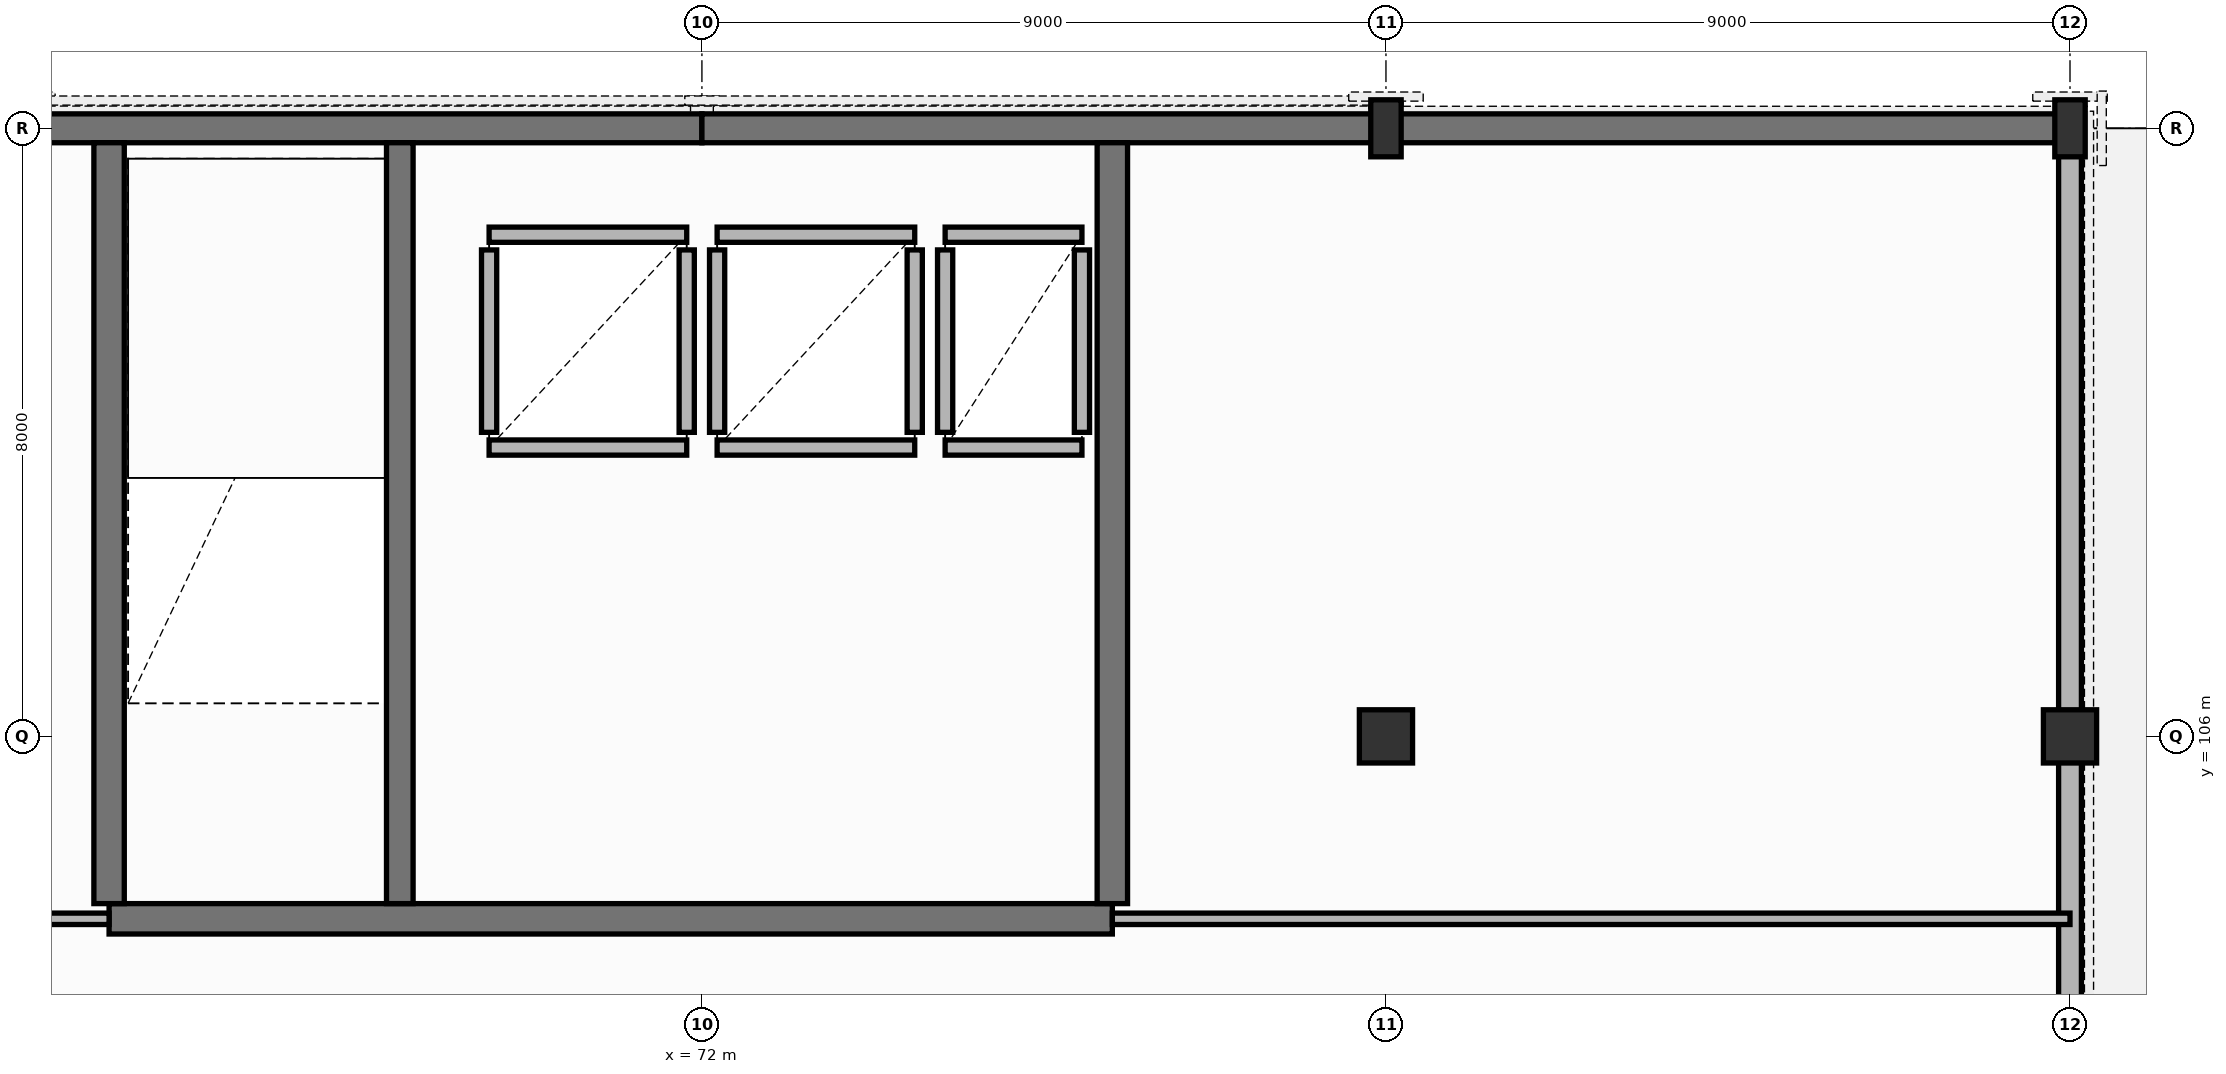
"""IFC4 building model, lengths in metres.
Left out: names, types, materials, properties, quantities, classifications, styles, units other than length and angle.
Written with IfcOpenShell. Run it as: python <this file> out.ifc"""

import sys

from ifc_helpers import new_model, si_unit, direction, frame, frame_2d, origin, origin_2d, place, context, subcontext, project, spatial, rectangle, extrude, element, fill, save


model = new_model("IFC4")
c1 = context("Model", 3, precision=1e-05, world=origin(), true_north=direction((0.0, 1.0)))
c2 = subcontext(c1, "Body", "Model", "MODEL_VIEW")
j1 = project(units=[si_unit("LENGTHUNIT", "METRE"), si_unit("PLANEANGLEUNIT", "RADIAN")], contexts=[c1])
p1 = place(None, origin())
s1 = spatial("IfcSite", under=j1, at=p1, CompositionType="ELEMENT")
p2 = place(p1, origin())
s2 = spatial("IfcBuilding", under=s1, at=p2, CompositionType="ELEMENT")
p3 = place(p2, frame((0.0, 0.0, 12.78)))
s3 = spatial("IfcBuildingStorey", under=s2, at=p3, CompositionType="ELEMENT", Elevation=12.78)
p4 = place(p3, frame((81.0, 106.0, 0.0), z_axis=(0.0, 0.0, 1.0), x_axis=(1.0, 0.0, 0.0)))
e1 = element("IfcColumn", 1, at=p4, inside=s3, PredefinedType="COLUMN", context=c2, shape_type="SweptSolid", body=[
    extrude(rectangle(XDim=0.7, YDim=0.7, at=origin_2d()), origin(), (0.0, 0.0, 1.0), 3.74),
])
p5 = place(p3, frame((81.0, 114.0, 0.0), z_axis=(0.0, 0.0, 1.0), x_axis=(0.0, 1.0, 0.0)))
e2 = element("IfcColumn", 2, at=p5, inside=s3, PredefinedType="COLUMN", context=c2, shape_type="SweptSolid", body=[
    extrude(rectangle(XDim=0.4, YDim=0.75, at=origin_2d()), origin(), (0.0, 0.0, 1.0), 3.74),
])
p6 = place(p3, frame((90.0, 106.0, 0.0), z_axis=(0.0, 0.0, 1.0), x_axis=(1.0, 0.0, 0.0)))
e3 = element("IfcColumn", 3, at=p6, inside=s3, PredefinedType="COLUMN", context=c2, shape_type="SweptSolid", body=[
    extrude(rectangle(XDim=0.7, YDim=0.7, at=origin_2d()), origin(), (0.0, 0.0, 1.0), 3.74),
])
p7 = place(p3, frame((90.0, 114.0, 0.0), z_axis=(0.0, 0.0, 1.0), x_axis=(0.0, 1.0, 0.0)))
e4 = element("IfcColumn", 4, at=p7, inside=s3, PredefinedType="COLUMN", context=c2, shape_type="SweptSolid", body=[
    extrude(rectangle(XDim=0.4, YDim=0.75, at=origin_2d()), origin(), (0.0, 0.0, 1.0), 3.74),
])
for number, where, z_axis, x_axis in (
    (5, (63.0, 114.0, 0.0), (0.0, 0.0, 1.0), (1.0, 0.0, 0.0)),
    (6, (72.0, 114.0, 0.0), (0.0, 0.0, 1.0), (1.0, 0.0, 0.0)),
):
    element("IfcWall", number, at=place(p3, frame(where, z_axis=z_axis, x_axis=x_axis)), inside=s3, PredefinedType="SOLIDWALL", context=c2, shape_type="SweptSolid", body=[
        extrude(rectangle(XDim=9.0, YDim=0.38, at=frame_2d((4.5, 0.0))), origin(), (0.0, 0.0, 1.0), 3.42),
    ])
p8 = place(p3, frame((81.0, 114.0, 0.0), z_axis=(0.0, 0.0, 1.0), x_axis=(1.0, 0.0, 0.0)))
e7 = element("IfcWall", 7, at=p8, inside=s3, PredefinedType="SOLIDWALL", context=c2, shape_type="SweptSolid", body=[
    extrude(rectangle(XDim=9.0, YDim=0.38, at=frame_2d((4.5, 0.0))), origin(), (0.0, 0.0, 1.0), 3.42),
])
p9 = place(p8, frame((2.2, 0.0, 0.815)))
e8 = element("IfcOpeningElement", 8, at=p9, cuts=e7, PredefinedType="OPENING", context=c2, shape_type="SweptSolid", body=[
    extrude(rectangle(XDim=0.96, YDim=1.95, at=frame_2d((0.48, 0.975))), frame((0.0, 0.2, 0.0), z_axis=(0.0, -1.0, 0.0), x_axis=(1.0, 0.0, 0.0)), (0.0, 0.0, 1.0), 0.4),
])
p10 = place(p8, frame((5.4, 0.0, 1.05)))
e9 = element("IfcOpeningElement", 9, at=p10, cuts=e7, PredefinedType="OPENING", context=c2, shape_type="SweptSolid", body=[
    extrude(rectangle(XDim=1.1, YDim=1.65, at=frame_2d((0.55, 0.825))), frame((0.0, 0.2, 0.0), z_axis=(0.0, -1.0, 0.0), x_axis=(1.0, 0.0, 0.0)), (0.0, 0.0, 1.0), 0.4),
])
p11 = place(p3, frame((90.0, 95.6, 0.0), z_axis=(0.0, 0.0, 1.0), x_axis=(0.0, 1.0, 0.0)))
e10 = element("IfcWall", 10, at=p11, inside=s3, PredefinedType="SOLIDWALL", context=c2, shape_type="SweptSolid", body=[
    extrude(rectangle(XDim=18.4, YDim=0.3, at=frame_2d((9.2, 0.0))), origin(), (0.0, 0.0, 1.0), 2.805),
])
p12 = place(p11, frame((4.4, 0.0, 0.0)))
e11 = element("IfcOpeningElement", 11, at=p12, cuts=e10, PredefinedType="OPENING", context=c2, shape_type="SweptSolid", body=[
    extrude(rectangle(XDim=1.6, YDim=2.25, at=frame_2d((0.8, 1.125))), frame((0.0, 0.16, 0.0), z_axis=(0.0, -1.0, 0.0), x_axis=(1.0, 0.0, 0.0)), (0.0, 0.0, 1.0), 0.32),
])
p13 = place(p11, frame((12.8, 0.0, 0.935)))
e12 = element("IfcOpeningElement", 12, at=p13, cuts=e10, PredefinedType="OPENING", context=c2, shape_type="SweptSolid", body=[
    extrude(rectangle(XDim=1.05, YDim=1.75, at=frame_2d((0.525, 0.875))), frame((0.0, 0.16, 0.0), z_axis=(0.0, -1.0, 0.0), x_axis=(1.0, 0.0, 0.0)), (0.0, 0.0, 1.0), 0.32),
])
p14 = place(p3, frame((64.2, 103.6, 0.0), z_axis=(0.0, 0.0, 1.0), x_axis=(1.0, 0.0, 0.0)))
e13 = element("IfcWall", 13, at=p14, inside=s3, PredefinedType="SHEAR", context=c2, shape_type="SweptSolid", body=[
    extrude(rectangle(XDim=13.2, YDim=0.4, at=frame_2d((6.6, 0.0))), origin(), (0.0, 0.0, 1.0), 3.42),
])
p15 = place(p14, frame((5.8, 0.0, 0.0)))
e14 = element("IfcOpeningElement", 14, at=p15, cuts=e13, PredefinedType="OPENING", context=c2, shape_type="SweptSolid", body=[
    extrude(rectangle(XDim=1.5, YDim=2.2, at=frame_2d((0.75, 1.1))), frame((0.0, 0.21, 0.0), z_axis=(0.0, -1.0, 0.0), x_axis=(1.0, 0.0, 0.0)), (0.0, 0.0, 1.0), 0.42),
])
for number, where, z_axis, x_axis in (
    (15, (64.2, 103.8, 0.0), (0.0, 0.0, 1.0), (0.0, 1.0, 0.0)),
    (16, (77.4, 103.8, 0.0), (0.0, 0.0, 1.0), (0.0, 1.0, 0.0)),
):
    element("IfcWall", number, at=place(p3, frame(where, z_axis=z_axis, x_axis=x_axis)), inside=s3, PredefinedType="SHEAR", context=c2, shape_type="SweptSolid", body=[
        extrude(rectangle(XDim=10.01, YDim=0.4, at=frame_2d((5.005, 0.0))), origin(), (0.0, 0.0, 1.0), 3.42),
    ])
p16 = place(p3, frame((68.025, 103.8, 0.0), z_axis=(0.0, 0.0, 1.0), x_axis=(0.0, 1.0, 0.0)))
e17 = element("IfcWall", 17, at=p16, inside=s3, PredefinedType="SHEAR", context=c2, shape_type="SweptSolid", body=[
    extrude(rectangle(XDim=10.01, YDim=0.35, at=frame_2d((5.005, 0.0))), origin(), (0.0, 0.0, 1.0), 3.42),
])
p17 = place(p16, frame((0.45, 0.0, 0.0)))
e18 = element("IfcOpeningElement", 18, at=p17, cuts=e17, PredefinedType="OPENING", context=c2, shape_type="SweptSolid", body=[
    extrude(rectangle(XDim=1.05, YDim=2.2, at=frame_2d((0.525, 1.1))), frame((0.0, 0.185, 0.0), z_axis=(0.0, -1.0, 0.0), x_axis=(1.0, 0.0, 0.0)), (0.0, 0.0, 1.0), 0.37),
])
p18 = place(p3, frame((69.2, 109.8, 0.0), z_axis=(0.0, 0.0, 1.0), x_axis=(1.0, 0.0, 0.0)))
e19 = element("IfcWall", 19, at=p18, inside=s3, PredefinedType="PARTITIONING", context=c2, shape_type="SweptSolid", body=[
    extrude(rectangle(XDim=2.6, YDim=0.2, at=frame_2d((1.3, 0.0))), origin(), (0.0, 0.0, 1.0), 3.42),
])
p19 = place(p18, frame((0.75, 0.0, 0.0)))
e20 = element("IfcOpeningElement", 20, at=p19, cuts=e19, PredefinedType="OPENING", context=c2, shape_type="SweptSolid", body=[
    extrude(rectangle(XDim=1.1, YDim=2.15, at=frame_2d((0.55, 1.075))), frame((0.0, 0.11, 0.0), z_axis=(0.0, -1.0, 0.0), x_axis=(1.0, 0.0, 0.0)), (0.0, 0.0, 1.0), 0.22),
])
p20 = place(p3, frame((69.2, 112.6, 0.0), z_axis=(0.0, 0.0, 1.0), x_axis=(1.0, 0.0, 0.0)))
e21 = element("IfcWall", 21, at=p20, inside=s3, PredefinedType="PARTITIONING", context=c2, shape_type="SweptSolid", body=[
    extrude(rectangle(XDim=2.6, YDim=0.2, at=frame_2d((1.3, 0.0))), origin(), (0.0, 0.0, 1.0), 3.42),
])
for number, where, z_axis, x_axis in (
    (22, (69.2, 110.0, 0.0), (0.0, 0.0, 1.0), (0.0, 1.0, 0.0)),
    (23, (71.8, 110.0, 0.0), (0.0, 0.0, 1.0), (0.0, 1.0, 0.0)),
):
    element("IfcWall", number, at=place(p3, frame(where, z_axis=z_axis, x_axis=x_axis)), inside=s3, PredefinedType="PARTITIONING", context=c2, shape_type="SweptSolid", body=[
        extrude(rectangle(XDim=2.4, YDim=0.2, at=frame_2d((1.2, 0.0))), origin(), (0.0, 0.0, 1.0), 3.42),
    ])
p21 = place(p3, frame((72.2, 109.8, 0.0), z_axis=(0.0, 0.0, 1.0), x_axis=(1.0, 0.0, 0.0)))
e24 = element("IfcWall", 24, at=p21, inside=s3, PredefinedType="PARTITIONING", context=c2, shape_type="SweptSolid", body=[
    extrude(rectangle(XDim=2.6, YDim=0.2, at=frame_2d((1.3, 0.0))), origin(), (0.0, 0.0, 1.0), 3.42),
])
p22 = place(p21, frame((0.75, 0.0, 0.0)))
e25 = element("IfcOpeningElement", 25, at=p22, cuts=e24, PredefinedType="OPENING", context=c2, shape_type="SweptSolid", body=[
    extrude(rectangle(XDim=1.1, YDim=2.15, at=frame_2d((0.55, 1.075))), frame((0.0, 0.11, 0.0), z_axis=(0.0, -1.0, 0.0), x_axis=(1.0, 0.0, 0.0)), (0.0, 0.0, 1.0), 0.22),
])
p23 = place(p3, frame((72.2, 112.6, 0.0), z_axis=(0.0, 0.0, 1.0), x_axis=(1.0, 0.0, 0.0)))
e26 = element("IfcWall", 26, at=p23, inside=s3, PredefinedType="PARTITIONING", context=c2, shape_type="SweptSolid", body=[
    extrude(rectangle(XDim=2.6, YDim=0.2, at=frame_2d((1.3, 0.0))), origin(), (0.0, 0.0, 1.0), 3.42),
])
for number, where, z_axis, x_axis in (
    (27, (72.2, 110.0, 0.0), (0.0, 0.0, 1.0), (0.0, 1.0, 0.0)),
    (28, (74.8, 110.0, 0.0), (0.0, 0.0, 1.0), (0.0, 1.0, 0.0)),
):
    element("IfcWall", number, at=place(p3, frame(where, z_axis=z_axis, x_axis=x_axis)), inside=s3, PredefinedType="PARTITIONING", context=c2, shape_type="SweptSolid", body=[
        extrude(rectangle(XDim=2.4, YDim=0.2, at=frame_2d((1.2, 0.0))), origin(), (0.0, 0.0, 1.0), 3.42),
    ])
p24 = place(p3, frame((75.2, 109.8, 0.0), z_axis=(0.0, 0.0, 1.0), x_axis=(1.0, 0.0, 0.0)))
e29 = element("IfcWall", 29, at=p24, inside=s3, PredefinedType="PARTITIONING", context=c2, shape_type="SweptSolid", body=[
    extrude(rectangle(XDim=1.8, YDim=0.2, at=frame_2d((0.9, 0.0))), origin(), (0.0, 0.0, 1.0), 3.42),
])
p25 = place(p24, frame((0.45, 0.0, 0.0)))
e30 = element("IfcOpeningElement", 30, at=p25, cuts=e29, PredefinedType="OPENING", context=c2, shape_type="SweptSolid", body=[
    extrude(rectangle(XDim=0.9, YDim=2.1, at=frame_2d((0.45, 1.05))), frame((0.0, 0.11, 0.0), z_axis=(0.0, -1.0, 0.0), x_axis=(1.0, 0.0, 0.0)), (0.0, 0.0, 1.0), 0.22),
])
p26 = place(p3, frame((75.2, 112.6, 0.0), z_axis=(0.0, 0.0, 1.0), x_axis=(1.0, 0.0, 0.0)))
e31 = element("IfcWall", 31, at=p26, inside=s3, PredefinedType="PARTITIONING", context=c2, shape_type="SweptSolid", body=[
    extrude(rectangle(XDim=1.8, YDim=0.2, at=frame_2d((0.9, 0.0))), origin(), (0.0, 0.0, 1.0), 3.42),
])
for number, where, z_axis, x_axis in (
    (32, (75.2, 110.0, 0.0), (0.0, 0.0, 1.0), (0.0, 1.0, 0.0)),
    (33, (77.0, 110.0, 0.0), (0.0, 0.0, 1.0), (0.0, 1.0, 0.0)),
):
    element("IfcWall", number, at=place(p3, frame(where, z_axis=z_axis, x_axis=x_axis)), inside=s3, PredefinedType="PARTITIONING", context=c2, shape_type="SweptSolid", body=[
        extrude(rectangle(XDim=2.4, YDim=0.2, at=frame_2d((1.2, 0.0))), origin(), (0.0, 0.0, 1.0), 3.42),
    ])
p27 = place(p3, frame((59.4, 103.6, 0.0), z_axis=(0.0, 0.0, 1.0), x_axis=(1.0, 0.0, 0.0)))
e34 = element("IfcWall", 34, at=p27, inside=s3, PredefinedType="PARTITIONING", context=c2, shape_type="SweptSolid", body=[
    extrude(rectangle(XDim=4.8, YDim=0.15, at=frame_2d((2.4, 0.0))), origin(), (0.0, 0.0, 1.0), 3.42),
])
p28 = place(p27, frame((1.6, 0.0, 0.0)))
e35 = element("IfcOpeningElement", 35, at=p28, cuts=e34, PredefinedType="OPENING", context=c2, shape_type="SweptSolid", body=[
    extrude(rectangle(XDim=1.0, YDim=2.15, at=frame_2d((0.5, 1.075))), frame((0.0, 0.085, 0.0), z_axis=(0.0, -1.0, 0.0), x_axis=(1.0, 0.0, 0.0)), (0.0, 0.0, 1.0), 0.17),
])
p29 = place(p3, frame((77.4, 103.6, 0.0), z_axis=(0.0, 0.0, 1.0), x_axis=(1.0, 0.0, 0.0)))
e36 = element("IfcWall", 36, at=p29, inside=s3, PredefinedType="PARTITIONING", context=c2, shape_type="SweptSolid", body=[
    extrude(rectangle(XDim=12.6, YDim=0.15, at=frame_2d((6.3, 0.0))), origin(), (0.0, 0.0, 1.0), 3.42),
])
p30 = place(p29, frame((5.6, 0.0, 0.0)))
e37 = element("IfcOpeningElement", 37, at=p30, cuts=e36, PredefinedType="OPENING", context=c2, shape_type="SweptSolid", body=[
    extrude(rectangle(XDim=1.0, YDim=2.15, at=frame_2d((0.5, 1.075))), frame((0.0, 0.085, 0.0), z_axis=(0.0, -1.0, 0.0), x_axis=(1.0, 0.0, 0.0)), (0.0, 0.0, 1.0), 0.17),
])
p31 = place(p9, origin())
e38 = element("IfcWindow", 38, at=p31, inside=s3, PartitioningType="SINGLE_PANEL", PredefinedType="WINDOW", context=c2, shape_type="SweptSolid", body=[
    extrude(rectangle(XDim=0.96, YDim=1.95, at=frame_2d((0.48, 0.975))), frame((0.0, 0.03, 0.0), z_axis=(0.0, -1.0, 0.0), x_axis=(1.0, 0.0, 0.0)), (0.0, 0.0, 1.0), 0.06),
])
fill(e8, e38)
p32 = place(p10, origin())
e39 = element("IfcWindow", 39, at=p32, inside=s3, PartitioningType="SINGLE_PANEL", PredefinedType="WINDOW", context=c2, shape_type="SweptSolid", body=[
    extrude(rectangle(XDim=1.1, YDim=1.65, at=frame_2d((0.55, 0.825))), frame((0.0, 0.03, 0.0), z_axis=(0.0, -1.0, 0.0), x_axis=(1.0, 0.0, 0.0)), (0.0, 0.0, 1.0), 0.06),
])
fill(e9, e39)
p33 = place(p13, origin())
e40 = element("IfcWindow", 40, at=p33, inside=s3, PartitioningType="SINGLE_PANEL", PredefinedType="WINDOW", context=c2, shape_type="SweptSolid", body=[
    extrude(rectangle(XDim=1.05, YDim=1.75, at=frame_2d((0.525, 0.875))), frame((0.0, 0.03, 0.0), z_axis=(0.0, -1.0, 0.0), x_axis=(1.0, 0.0, 0.0)), (0.0, 0.0, 1.0), 0.06),
])
fill(e12, e40)
p34 = place(p15, origin())
e41 = element("IfcDoor", 41, at=p34, inside=s3, OperationType="DOUBLE_DOOR_SINGLE_SWING", PredefinedType="DOOR", context=c2, shape_type="SweptSolid", body=[
    extrude(rectangle(XDim=1.5, YDim=2.2, at=frame_2d((0.75, 1.1))), frame((0.0, 0.025, 0.0), z_axis=(0.0, -1.0, 0.0), x_axis=(1.0, 0.0, 0.0)), (0.0, 0.0, 1.0), 0.05),
])
fill(e14, e41)
p35 = place(p17, origin())
e42 = element("IfcDoor", 42, at=p35, inside=s3, OperationType="SINGLE_SWING_RIGHT", PredefinedType="DOOR", context=c2, shape_type="SweptSolid", body=[
    extrude(rectangle(XDim=1.05, YDim=2.2, at=frame_2d((0.525, 1.1))), frame((0.0, 0.025, 0.0), z_axis=(0.0, -1.0, 0.0), x_axis=(1.0, 0.0, 0.0)), (0.0, 0.0, 1.0), 0.05),
])
fill(e18, e42)
p36 = place(p19, origin())
e43 = element("IfcDoor", 43, at=p36, inside=s3, OperationType="SLIDING_TO_LEFT", PredefinedType="DOOR", context=c2, shape_type="SweptSolid", body=[
    extrude(rectangle(XDim=1.1, YDim=2.15, at=frame_2d((0.55, 1.075))), frame((0.0, 0.025, 0.0), z_axis=(0.0, -1.0, 0.0), x_axis=(1.0, 0.0, 0.0)), (0.0, 0.0, 1.0), 0.05),
])
fill(e20, e43)
p37 = place(p22, origin())
e44 = element("IfcDoor", 44, at=p37, inside=s3, OperationType="SLIDING_TO_RIGHT", PredefinedType="DOOR", context=c2, shape_type="SweptSolid", body=[
    extrude(rectangle(XDim=1.1, YDim=2.15, at=frame_2d((0.55, 1.075))), frame((0.0, 0.025, 0.0), z_axis=(0.0, -1.0, 0.0), x_axis=(1.0, 0.0, 0.0)), (0.0, 0.0, 1.0), 0.05),
])
fill(e25, e44)
p38 = place(p25, origin())
e45 = element("IfcDoor", 45, at=p38, inside=s3, OperationType="SINGLE_SWING_RIGHT", PredefinedType="DOOR", context=c2, shape_type="SweptSolid", body=[
    extrude(rectangle(XDim=0.9, YDim=2.1, at=frame_2d((0.45, 1.05))), frame((0.0, 0.025, 0.0), z_axis=(0.0, -1.0, 0.0), x_axis=(1.0, 0.0, 0.0)), (0.0, 0.0, 1.0), 0.05),
])
fill(e30, e45)
p39 = place(p30, origin())
e46 = element("IfcDoor", 46, at=p39, inside=s3, OperationType="SINGLE_SWING_LEFT", PredefinedType="DOOR", context=c2, shape_type="SweptSolid", body=[
    extrude(rectangle(XDim=1.0, YDim=2.15, at=frame_2d((0.5, 1.075))), frame((0.0, 0.025, 0.0), z_axis=(0.0, -1.0, 0.0), x_axis=(1.0, 0.0, 0.0)), (0.0, 0.0, 1.0), 0.05),
])
fill(e37, e46)
save(model, sys.argv[1])
